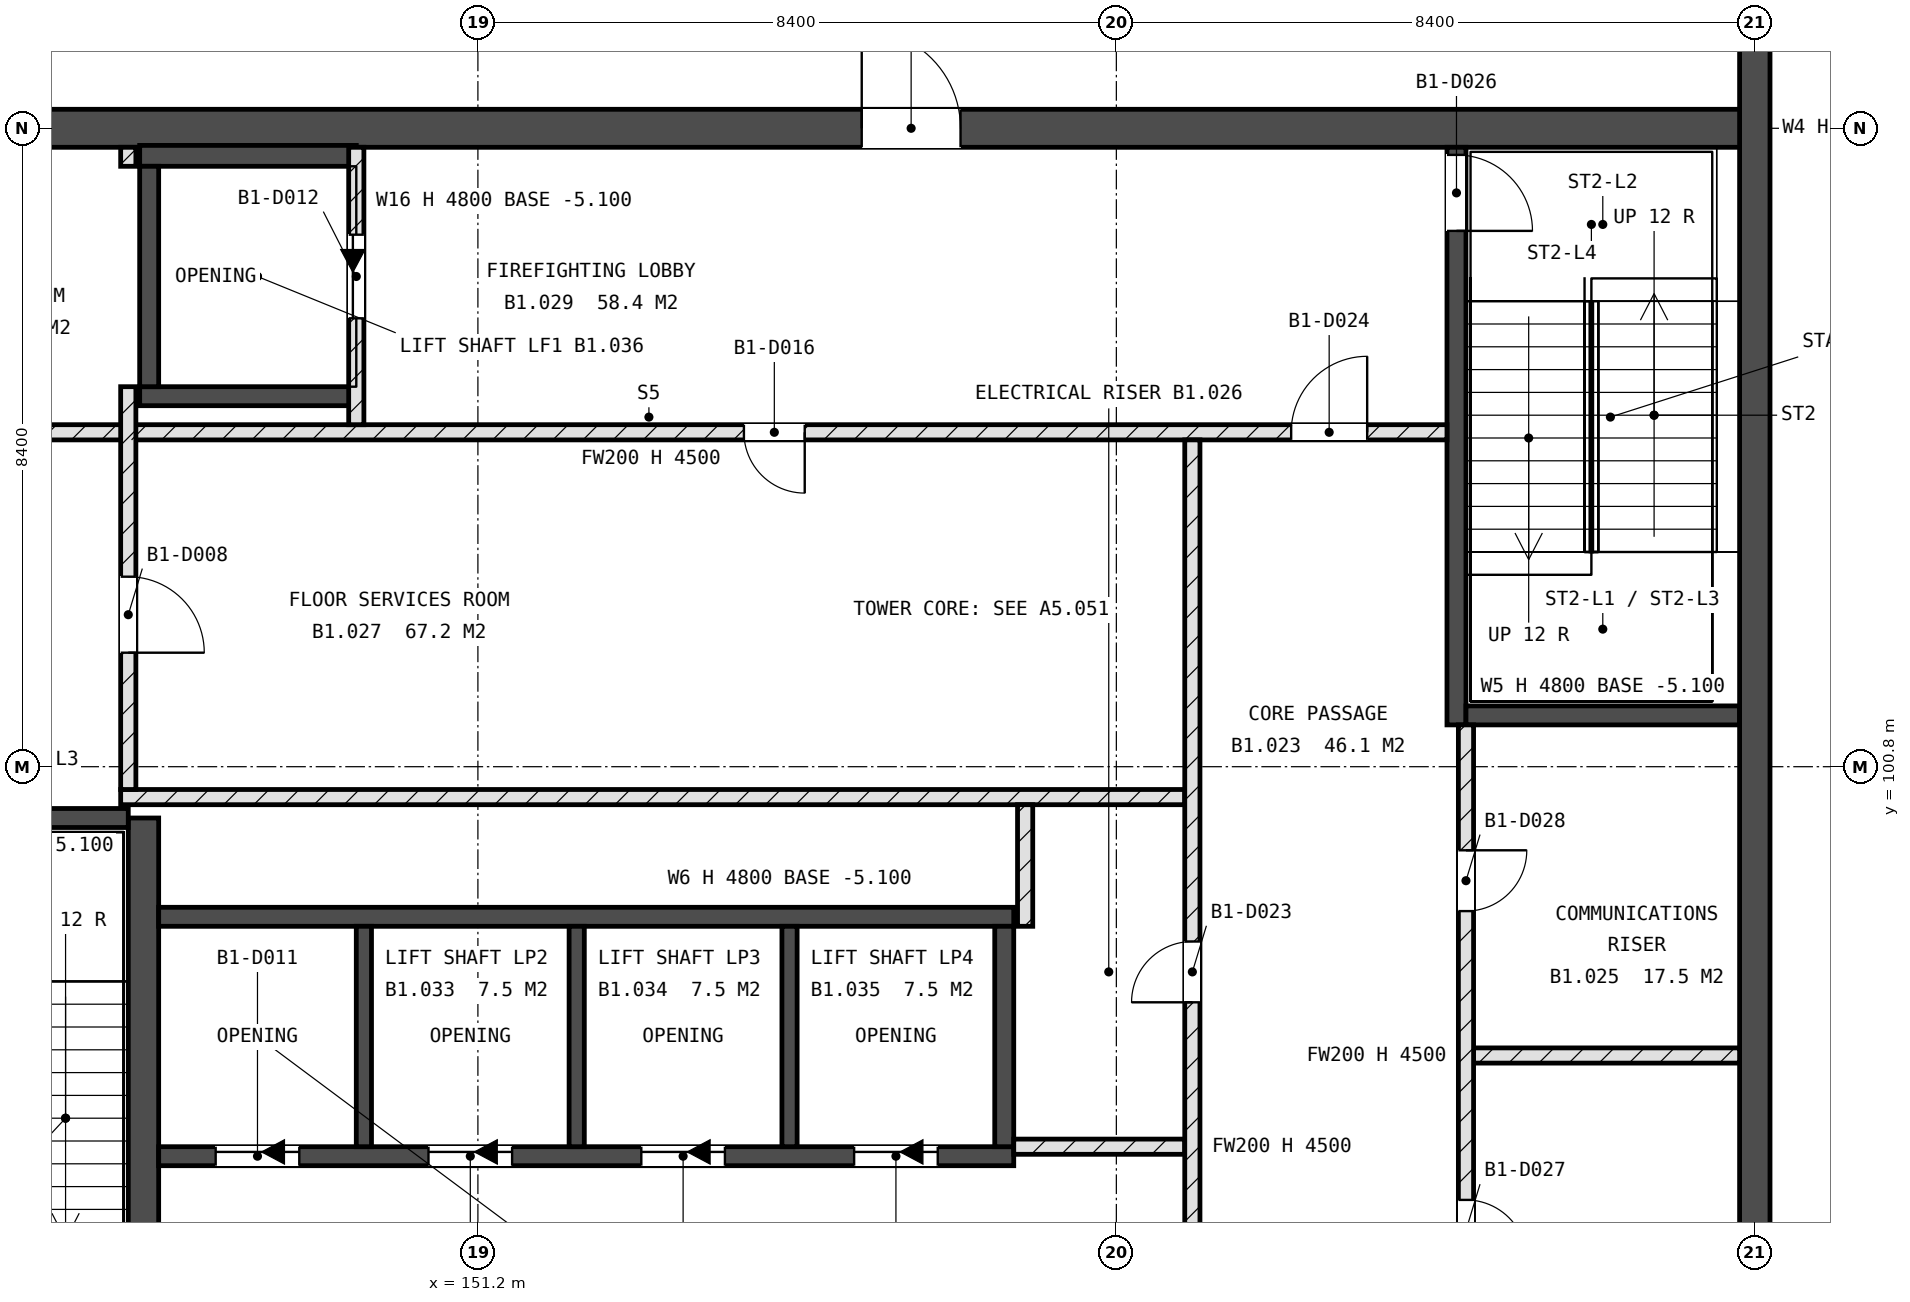
"""IFC4 building model, lengths in metres.
Left out: names, types, materials, properties, quantities, classifications, styles, units other than length and angle.
Written with IfcOpenShell. Run it as: python <this file> out.ifc"""

import sys

from ifc_helpers import new_model, si_unit, direction, frame, frame_2d, origin, place, context, subcontext, project, spatial, rectangle, extrude, element, fill, save


model = new_model("IFC4")
c1 = context("Model", 3, precision=1e-05, world=origin(), true_north=direction((0.0, 1.0)))
c2 = subcontext(c1, "Body", "Model", "MODEL_VIEW")
j1 = project(units=[si_unit("LENGTHUNIT", "METRE"), si_unit("PLANEANGLEUNIT", "RADIAN")], contexts=[c1])
p1 = place(None, origin())
s1 = spatial("IfcSite", under=j1, at=p1, CompositionType="ELEMENT")
p2 = place(p1, origin())
s2 = spatial("IfcBuilding", under=s1, at=p2, CompositionType="ELEMENT")
p3 = place(p2, frame((0.0, 0.0, -4.8)))
s3 = spatial("IfcBuildingStorey", under=s2, at=p3, CompositionType="ELEMENT", Elevation=-4.8)
p4 = place(p3, frame((142.8, 109.2, -0.3), z_axis=(0.0, 0.0, 1.0), x_axis=(1.0, 0.0, 0.0)))
e1 = element("IfcWall", 1, at=p4, inside=s3, PredefinedType="SHEAR", context=c2, shape_type="SweptSolid", body=[
    extrude(rectangle(XDim=25.2, YDim=0.5, at=frame_2d((12.6, 0.0))), origin(), (0.0, 0.0, 1.0), 4.8),
])
p5 = place(p4, frame((13.45, 0.0, 0.3)))
e2 = element("IfcOpeningElement", 2, at=p5, cuts=e1, PredefinedType="OPENING", context=c2, shape_type="SweptSolid", body=[
    extrude(rectangle(XDim=1.3, YDim=2.1, at=frame_2d((0.65, 1.05))), frame((0.0, 0.26, 0.0), z_axis=(0.0, -1.0, 0.0), x_axis=(1.0, 0.0, 0.0)), (0.0, 0.0, 1.0), 0.52),
])
p6 = place(p4, frame((1.5, 0.0, 0.3)))
e3 = element("IfcOpeningElement", 3, at=p6, cuts=e1, PredefinedType="OPENING", context=c2, shape_type="SweptSolid", body=[
    extrude(rectangle(XDim=0.8, YDim=2.1, at=frame_2d((0.4, 1.05))), frame((0.0, 0.26, 0.0), z_axis=(0.0, -1.0, 0.0), x_axis=(1.0, 0.0, 0.0)), (0.0, 0.0, 1.0), 0.52),
])
p7 = place(p3, frame((146.8, 92.65, -0.3), z_axis=(0.0, 0.0, 1.0), x_axis=(0.0, 1.0, 0.0)))
e4 = element("IfcWall", 4, at=p7, inside=s3, PredefinedType="SHEAR", context=c2, shape_type="SweptSolid", body=[
    extrude(rectangle(XDim=7.475, YDim=0.4, at=frame_2d((3.738, 0.0))), origin(), (0.0, 0.0, 1.0), 4.8),
])
p8 = place(p7, frame((0.1, 0.0, 0.3)))
e5 = element("IfcOpeningElement", 5, at=p8, cuts=e4, PredefinedType="OPENING", context=c2, shape_type="SweptSolid", body=[
    extrude(rectangle(XDim=1.0, YDim=2.1, at=frame_2d((0.5, 1.05))), frame((0.0, 0.21, 0.0), z_axis=(0.0, -1.0, 0.0), x_axis=(1.0, 0.0, 0.0)), (0.0, 0.0, 1.0), 0.42),
])
p9 = place(p3, frame((143.0, 100.125, -0.3), z_axis=(0.0, 0.0, 1.0), x_axis=(1.0, 0.0, 0.0)))
e6 = element("IfcWall", 6, at=p9, inside=s3, PredefinedType="SHEAR", context=c2, shape_type="SweptSolid", body=[
    extrude(rectangle(XDim=3.6, YDim=0.25, at=frame_2d((1.8, 0.0))), origin(), (0.0, 0.0, 1.0), 4.8),
])
p10 = place(p3, frame((164.075, 101.35, -0.3), z_axis=(0.0, 0.0, 1.0), x_axis=(0.0, 1.0, 0.0)))
e7 = element("IfcWall", 7, at=p10, inside=s3, PredefinedType="SHEAR", context=c2, shape_type="SweptSolid", body=[
    extrude(rectangle(XDim=7.6, YDim=0.25, at=frame_2d((3.8, 0.0))), origin(), (0.0, 0.0, 1.0), 4.8),
])
p11 = place(p10, frame((6.5, 0.0, 0.3)))
e8 = element("IfcOpeningElement", 8, at=p11, cuts=e7, PredefinedType="OPENING", context=c2, shape_type="SweptSolid", body=[
    extrude(rectangle(XDim=1.0, YDim=2.1, at=frame_2d((0.5, 1.05))), frame((0.0, 0.135, 0.0), z_axis=(0.0, -1.0, 0.0), x_axis=(1.0, 0.0, 0.0)), (0.0, 0.0, 1.0), 0.27),
])
p12 = place(p3, frame((164.2, 101.475, -0.3), z_axis=(0.0, 0.0, 1.0), x_axis=(1.0, 0.0, 0.0)))
e9 = element("IfcWall", 9, at=p12, inside=s3, PredefinedType="SHEAR", context=c2, shape_type="SweptSolid", body=[
    extrude(rectangle(XDim=3.6, YDim=0.25, at=frame_2d((1.8, 0.0))), origin(), (0.0, 0.0, 1.0), 4.8),
])
p13 = place(p3, frame((147.0, 95.675, -0.3), z_axis=(0.0, 0.0, 1.0), x_axis=(1.0, 0.0, 0.0)))
e10 = element("IfcWall", 10, at=p13, inside=s3, PredefinedType="SHEAR", context=c2, shape_type="SweptSolid", body=[
    extrude(rectangle(XDim=11.25, YDim=0.25, at=frame_2d((5.625, 0.0))), origin(), (0.0, 0.0, 1.0), 4.8),
])
p14 = place(p13, frame((0.75, 0.0, 0.3)))
e11 = element("IfcOpeningElement", 11, at=p14, cuts=e10, PredefinedType="OPENING", context=c2, shape_type="SweptSolid", body=[
    extrude(rectangle(XDim=1.1, YDim=2.1, at=frame_2d((0.55, 1.05))), frame((0.0, 0.135, 0.0), z_axis=(0.0, -1.0, 0.0), x_axis=(1.0, 0.0, 0.0)), (0.0, 0.0, 1.0), 0.27),
])
p15 = place(p13, frame((3.55, 0.0, 0.3)))
e12 = element("IfcOpeningElement", 12, at=p15, cuts=e10, PredefinedType="OPENING", context=c2, shape_type="SweptSolid", body=[
    extrude(rectangle(XDim=1.1, YDim=2.1, at=frame_2d((0.55, 1.05))), frame((0.0, 0.135, 0.0), z_axis=(0.0, -1.0, 0.0), x_axis=(1.0, 0.0, 0.0)), (0.0, 0.0, 1.0), 0.27),
])
p16 = place(p13, frame((6.35, 0.0, 0.3)))
e13 = element("IfcOpeningElement", 13, at=p16, cuts=e10, PredefinedType="OPENING", context=c2, shape_type="SweptSolid", body=[
    extrude(rectangle(XDim=1.1, YDim=2.1, at=frame_2d((0.55, 1.05))), frame((0.0, 0.135, 0.0), z_axis=(0.0, -1.0, 0.0), x_axis=(1.0, 0.0, 0.0)), (0.0, 0.0, 1.0), 0.27),
])
p17 = place(p13, frame((9.15, 0.0, 0.3)))
e14 = element("IfcOpeningElement", 14, at=p17, cuts=e10, PredefinedType="OPENING", context=c2, shape_type="SweptSolid", body=[
    extrude(rectangle(XDim=1.1, YDim=2.1, at=frame_2d((0.55, 1.05))), frame((0.0, 0.135, 0.0), z_axis=(0.0, -1.0, 0.0), x_axis=(1.0, 0.0, 0.0)), (0.0, 0.0, 1.0), 0.27),
])
p18 = place(p3, frame((147.0, 98.825, -0.3), z_axis=(0.0, 0.0, 1.0), x_axis=(1.0, 0.0, 0.0)))
e15 = element("IfcWall", 15, at=p18, inside=s3, PredefinedType="SHEAR", context=c2, shape_type="SweptSolid", body=[
    extrude(rectangle(XDim=11.25, YDim=0.25, at=frame_2d((5.625, 0.0))), origin(), (0.0, 0.0, 1.0), 4.8),
])
p19 = place(p3, frame((158.125, 95.8, -0.3), z_axis=(0.0, 0.0, 1.0), x_axis=(0.0, 1.0, 0.0)))
e16 = element("IfcWall", 16, at=p19, inside=s3, PredefinedType="SHEAR", context=c2, shape_type="SweptSolid", body=[
    extrude(rectangle(XDim=2.9, YDim=0.25, at=frame_2d((1.45, 0.0))), origin(), (0.0, 0.0, 1.0), 4.8),
])
for number, where, z_axis, x_axis in (
    (17, (149.7, 95.8, -0.3), (0.0, 0.0, 1.0), (0.0, 1.0, 0.0)),
    (18, (152.5, 95.8, -0.3), (0.0, 0.0, 1.0), (0.0, 1.0, 0.0)),
    (19, (155.3, 95.8, -0.3), (0.0, 0.0, 1.0), (0.0, 1.0, 0.0)),
):
    element("IfcWall", number, at=place(p3, frame(where, z_axis=z_axis, x_axis=x_axis)), inside=s3, PredefinedType="SHEAR", context=c2, shape_type="SweptSolid", body=[
        extrude(rectangle(XDim=2.9, YDim=0.2, at=frame_2d((1.45, 0.0))), origin(), (0.0, 0.0, 1.0), 4.8),
    ])
p20 = place(p3, frame((146.75, 105.675, -0.3), z_axis=(0.0, 0.0, 1.0), x_axis=(1.0, 0.0, 0.0)))
e20 = element("IfcWall", 20, at=p20, inside=s3, PredefinedType="SHEAR", context=c2, shape_type="SweptSolid", body=[
    extrude(rectangle(XDim=2.85, YDim=0.25, at=frame_2d((1.425, 0.0))), origin(), (0.0, 0.0, 1.0), 4.8),
])
p21 = place(p3, frame((146.75, 108.837, -0.3), z_axis=(0.0, 0.0, 1.0), x_axis=(1.0, 0.0, 0.0)))
e21 = element("IfcWall", 21, at=p21, inside=s3, PredefinedType="SHEAR", context=c2, shape_type="SweptSolid", body=[
    extrude(rectangle(XDim=2.85, YDim=0.275, at=frame_2d((1.425, 0.0))), origin(), (0.0, 0.0, 1.0), 4.8),
])
p22 = place(p3, frame((146.875, 105.8, -0.3), z_axis=(0.0, 0.0, 1.0), x_axis=(0.0, 1.0, 0.0)))
e22 = element("IfcWall", 22, at=p22, inside=s3, PredefinedType="SHEAR", context=c2, shape_type="SweptSolid", body=[
    extrude(rectangle(XDim=2.9, YDim=0.25, at=frame_2d((1.45, 0.0))), origin(), (0.0, 0.0, 1.0), 4.8),
])
p23 = place(p3, frame((168.0, -0.2, -0.3), z_axis=(0.0, 0.0, 1.0), x_axis=(0.0, 1.0, 0.0)))
e23 = element("IfcWall", 23, at=p23, inside=s3, PredefinedType="SOLIDWALL", context=c2, shape_type="SweptSolid", body=[
    extrude(rectangle(XDim=118.0, YDim=0.4, at=frame_2d((59.0, 0.0))), origin(), (0.0, 0.0, 1.0), 4.8),
])
p24 = place(p3, frame((158.25, 95.8, 0.0), z_axis=(0.0, 0.0, 1.0), x_axis=(1.0, 0.0, 0.0)))
e24 = element("IfcWall", 24, at=p24, inside=s3, PredefinedType="SOLIDWALL", context=c2, shape_type="SweptSolid", body=[
    extrude(rectangle(XDim=2.25, YDim=0.2, at=frame_2d((1.125, 0.0))), origin(), (0.0, 0.0, 1.0), 4.5),
])
p25 = place(p3, frame((164.3, 97.0, 0.0), z_axis=(0.0, 0.0, 1.0), x_axis=(1.0, 0.0, 0.0)))
e25 = element("IfcWall", 25, at=p25, inside=s3, PredefinedType="SOLIDWALL", context=c2, shape_type="SweptSolid", body=[
    extrude(rectangle(XDim=3.5, YDim=0.2, at=frame_2d((1.75, 0.0))), origin(), (0.0, 0.0, 1.0), 4.5),
])
p26 = place(p3, frame((146.5, 100.4, 0.0), z_axis=(0.0, 0.0, 1.0), x_axis=(1.0, 0.0, 0.0)))
e26 = element("IfcWall", 26, at=p26, inside=s3, PredefinedType="SOLIDWALL", context=c2, shape_type="SweptSolid", body=[
    extrude(rectangle(XDim=14.0, YDim=0.2, at=frame_2d((7.0, 0.0))), origin(), (0.0, 0.0, 1.0), 4.5),
])
p27 = place(p3, frame((143.0, 105.2, 0.0), z_axis=(0.0, 0.0, 1.0), x_axis=(1.0, 0.0, 0.0)))
e27 = element("IfcWall", 27, at=p27, inside=s3, PredefinedType="SOLIDWALL", context=c2, shape_type="SweptSolid", body=[
    extrude(rectangle(XDim=20.95, YDim=0.2, at=frame_2d((10.475, 0.0))), origin(), (0.0, 0.0, 1.0), 4.5),
])
p28 = place(p27, frame((11.7, 0.0, 0.0)))
e28 = element("IfcOpeningElement", 28, at=p28, cuts=e27, PredefinedType="OPENING", context=c2, shape_type="SweptSolid", body=[
    extrude(rectangle(XDim=0.8, YDim=2.1, at=frame_2d((0.4, 1.05))), frame((0.0, 0.11, 0.0), z_axis=(0.0, -1.0, 0.0), x_axis=(1.0, 0.0, 0.0)), (0.0, 0.0, 1.0), 0.22),
])
p29 = place(p27, frame((18.9, 0.0, 0.0)))
e29 = element("IfcOpeningElement", 29, at=p29, cuts=e27, PredefinedType="OPENING", context=c2, shape_type="SweptSolid", body=[
    extrude(rectangle(XDim=1.0, YDim=2.1, at=frame_2d((0.5, 1.05))), frame((0.0, 0.11, 0.0), z_axis=(0.0, -1.0, 0.0), x_axis=(1.0, 0.0, 0.0)), (0.0, 0.0, 1.0), 0.22),
])
p30 = place(p3, frame((146.6, 100.5, 0.0), z_axis=(0.0, 0.0, 1.0), x_axis=(0.0, 1.0, 0.0)))
e30 = element("IfcWall", 30, at=p30, inside=s3, PredefinedType="SOLIDWALL", context=c2, shape_type="SweptSolid", body=[
    extrude(rectangle(XDim=5.3, YDim=0.2, at=frame_2d((2.65, 0.0))), origin(), (0.0, 0.0, 1.0), 4.5),
])
p31 = place(p30, frame((1.8, 0.0, 0.0)))
e31 = element("IfcOpeningElement", 31, at=p31, cuts=e30, PredefinedType="OPENING", context=c2, shape_type="SweptSolid", body=[
    extrude(rectangle(XDim=1.0, YDim=2.1, at=frame_2d((0.5, 1.05))), frame((0.0, 0.11, 0.0), z_axis=(0.0, -1.0, 0.0), x_axis=(1.0, 0.0, 0.0)), (0.0, 0.0, 1.0), 0.22),
])
p32 = place(p3, frame((146.6, 108.7, 0.0), z_axis=(0.0, 0.0, 1.0), x_axis=(0.0, 1.0, 0.0)))
e32 = element("IfcWall", 32, at=p32, inside=s3, PredefinedType="SOLIDWALL", context=c2, shape_type="SweptSolid", body=[
    extrude(rectangle(XDim=0.25, YDim=0.2, at=frame_2d((0.125, 0.0))), origin(), (0.0, 0.0, 1.0), 4.5),
])
p33 = place(p3, frame((149.6, 105.3, 0.0), z_axis=(0.0, 0.0, 1.0), x_axis=(0.0, 1.0, 0.0)))
e33 = element("IfcWall", 33, at=p33, inside=s3, PredefinedType="SOLIDWALL", context=c2, shape_type="SweptSolid", body=[
    extrude(rectangle(XDim=3.65, YDim=0.2, at=frame_2d((1.825, 0.0))), origin(), (0.0, 0.0, 1.0), 4.5),
])
p34 = place(p33, frame((1.4, 0.0, 0.0)))
e34 = element("IfcOpeningElement", 34, at=p34, cuts=e33, PredefinedType="OPENING", context=c2, shape_type="SweptSolid", body=[
    extrude(rectangle(XDim=1.1, YDim=2.1, at=frame_2d((0.55, 1.05))), frame((0.0, 0.11, 0.0), z_axis=(0.0, -1.0, 0.0), x_axis=(1.0, 0.0, 0.0)), (0.0, 0.0, 1.0), 0.22),
])
p35 = place(p3, frame((158.4, 98.7, 0.0), z_axis=(0.0, 0.0, 1.0), x_axis=(0.0, 1.0, 0.0)))
e35 = element("IfcWall", 35, at=p35, inside=s3, PredefinedType="SOLIDWALL", context=c2, shape_type="SweptSolid", body=[
    extrude(rectangle(XDim=1.6, YDim=0.2, at=frame_2d((0.8, 0.0))), origin(), (0.0, 0.0, 1.0), 4.5),
])
p36 = place(p3, frame((160.6, 92.65, 0.0), z_axis=(0.0, 0.0, 1.0), x_axis=(0.0, 1.0, 0.0)))
e36 = element("IfcWall", 36, at=p36, inside=s3, PredefinedType="SOLIDWALL", context=c2, shape_type="SweptSolid", body=[
    extrude(rectangle(XDim=12.45, YDim=0.2, at=frame_2d((6.225, 0.0))), origin(), (0.0, 0.0, 1.0), 4.5),
])
p37 = place(p36, frame((5.05, 0.0, 0.0)))
e37 = element("IfcOpeningElement", 37, at=p37, cuts=e36, PredefinedType="OPENING", context=c2, shape_type="SweptSolid", body=[
    extrude(rectangle(XDim=0.8, YDim=2.1, at=frame_2d((0.4, 1.05))), frame((0.0, 0.11, 0.0), z_axis=(0.0, -1.0, 0.0), x_axis=(1.0, 0.0, 0.0)), (0.0, 0.0, 1.0), 0.22),
])
p38 = place(p36, frame((0.75, 0.0, 0.0)))
e38 = element("IfcOpeningElement", 38, at=p38, cuts=e36, PredefinedType="OPENING", context=c2, shape_type="SweptSolid", body=[
    extrude(rectangle(XDim=1.0, YDim=2.1, at=frame_2d((0.5, 1.05))), frame((0.0, 0.11, 0.0), z_axis=(0.0, -1.0, 0.0), x_axis=(1.0, 0.0, 0.0)), (0.0, 0.0, 1.0), 0.22),
])
p39 = place(p3, frame((164.2, 92.65, 0.0), z_axis=(0.0, 0.0, 1.0), x_axis=(0.0, 1.0, 0.0)))
e39 = element("IfcWall", 39, at=p39, inside=s3, PredefinedType="SOLIDWALL", context=c2, shape_type="SweptSolid", body=[
    extrude(rectangle(XDim=8.7, YDim=0.2, at=frame_2d((4.35, 0.0))), origin(), (0.0, 0.0, 1.0), 4.5),
])
p40 = place(p39, frame((1.65, 0.0, 0.0)))
e40 = element("IfcOpeningElement", 40, at=p40, cuts=e39, PredefinedType="OPENING", context=c2, shape_type="SweptSolid", body=[
    extrude(rectangle(XDim=0.8, YDim=2.1, at=frame_2d((0.4, 1.05))), frame((0.0, 0.11, 0.0), z_axis=(0.0, -1.0, 0.0), x_axis=(1.0, 0.0, 0.0)), (0.0, 0.0, 1.0), 0.22),
])
p41 = place(p39, frame((6.25, 0.0, 0.0)))
e41 = element("IfcOpeningElement", 41, at=p41, cuts=e39, PredefinedType="OPENING", context=c2, shape_type="SweptSolid", body=[
    extrude(rectangle(XDim=0.8, YDim=2.1, at=frame_2d((0.4, 1.05))), frame((0.0, 0.11, 0.0), z_axis=(0.0, -1.0, 0.0), x_axis=(1.0, 0.0, 0.0)), (0.0, 0.0, 1.0), 0.22),
])
p42 = place(p14, origin())
e42 = element("IfcDoor", 42, at=p42, inside=s3, OperationType="SLIDING_TO_LEFT", PredefinedType="DOOR", context=c2, shape_type="SweptSolid", body=[
    extrude(rectangle(XDim=1.1, YDim=2.1, at=frame_2d((0.55, 1.05))), frame((0.0, 0.025, 0.0), z_axis=(0.0, -1.0, 0.0), x_axis=(1.0, 0.0, 0.0)), (0.0, 0.0, 1.0), 0.05),
])
fill(e11, e42)
p43 = place(p15, origin())
e43 = element("IfcDoor", 43, at=p43, inside=s3, OperationType="SLIDING_TO_LEFT", PredefinedType="DOOR", context=c2, shape_type="SweptSolid", body=[
    extrude(rectangle(XDim=1.1, YDim=2.1, at=frame_2d((0.55, 1.05))), frame((0.0, 0.025, 0.0), z_axis=(0.0, -1.0, 0.0), x_axis=(1.0, 0.0, 0.0)), (0.0, 0.0, 1.0), 0.05),
])
fill(e12, e43)
p44 = place(p16, origin())
e44 = element("IfcDoor", 44, at=p44, inside=s3, OperationType="SLIDING_TO_LEFT", PredefinedType="DOOR", context=c2, shape_type="SweptSolid", body=[
    extrude(rectangle(XDim=1.1, YDim=2.1, at=frame_2d((0.55, 1.05))), frame((0.0, 0.025, 0.0), z_axis=(0.0, -1.0, 0.0), x_axis=(1.0, 0.0, 0.0)), (0.0, 0.0, 1.0), 0.05),
])
fill(e13, e44)
p45 = place(p17, origin())
e45 = element("IfcDoor", 45, at=p45, inside=s3, OperationType="SLIDING_TO_LEFT", PredefinedType="DOOR", context=c2, shape_type="SweptSolid", body=[
    extrude(rectangle(XDim=1.1, YDim=2.1, at=frame_2d((0.55, 1.05))), frame((0.0, 0.025, 0.0), z_axis=(0.0, -1.0, 0.0), x_axis=(1.0, 0.0, 0.0)), (0.0, 0.0, 1.0), 0.05),
])
fill(e14, e45)
p46 = place(p34, origin())
e46 = element("IfcDoor", 46, at=p46, inside=s3, OperationType="SLIDING_TO_LEFT", PredefinedType="DOOR", context=c2, shape_type="SweptSolid", body=[
    extrude(rectangle(XDim=1.1, YDim=2.1, at=frame_2d((0.55, 1.05))), frame((0.0, 0.025, 0.0), z_axis=(0.0, -1.0, 0.0), x_axis=(1.0, 0.0, 0.0)), (0.0, 0.0, 1.0), 0.05),
])
fill(e34, e46)
p47 = place(p11, origin())
e47 = element("IfcDoor", 47, at=p47, inside=s3, OperationType="SINGLE_SWING_LEFT", PredefinedType="DOOR", context=c2, shape_type="SweptSolid", body=[
    extrude(rectangle(XDim=1.0, YDim=2.1, at=frame_2d((0.5, 1.05))), frame((0.0, 0.025, 0.0), z_axis=(0.0, -1.0, 0.0), x_axis=(1.0, 0.0, 0.0)), (0.0, 0.0, 1.0), 0.05),
])
fill(e8, e47)
p48 = place(p5, origin())
e48 = element("IfcDoor", 48, at=p48, inside=s3, OperationType="SINGLE_SWING_RIGHT", PredefinedType="DOOR", context=c2, shape_type="SweptSolid", body=[
    extrude(rectangle(XDim=1.3, YDim=2.1, at=frame_2d((0.65, 1.05))), frame((0.0, 0.025, 0.0), z_axis=(0.0, -1.0, 0.0), x_axis=(1.0, 0.0, 0.0)), (0.0, 0.0, 1.0), 0.05),
])
fill(e2, e48)
p49 = place(p40, origin())
e49 = element("IfcDoor", 49, at=p49, inside=s3, OperationType="SINGLE_SWING_LEFT", PredefinedType="DOOR", context=c2, shape_type="SweptSolid", body=[
    extrude(rectangle(XDim=0.8, YDim=2.1, at=frame_2d((0.4, 1.05))), frame((0.0, 0.025, 0.0), z_axis=(0.0, -1.0, 0.0), x_axis=(1.0, 0.0, 0.0)), (0.0, 0.0, 1.0), 0.05),
])
fill(e40, e49)
p50 = place(p41, origin())
e50 = element("IfcDoor", 50, at=p50, inside=s3, OperationType="SINGLE_SWING_RIGHT", PredefinedType="DOOR", context=c2, shape_type="SweptSolid", body=[
    extrude(rectangle(XDim=0.8, YDim=2.1, at=frame_2d((0.4, 1.05))), frame((0.0, 0.025, 0.0), z_axis=(0.0, -1.0, 0.0), x_axis=(1.0, 0.0, 0.0)), (0.0, 0.0, 1.0), 0.05),
])
fill(e41, e50)
p51 = place(p37, origin())
e51 = element("IfcDoor", 51, at=p51, inside=s3, OperationType="SINGLE_SWING_RIGHT", PredefinedType="DOOR", context=c2, shape_type="SweptSolid", body=[
    extrude(rectangle(XDim=0.8, YDim=2.1, at=frame_2d((0.4, 1.05))), frame((0.0, 0.025, 0.0), z_axis=(0.0, -1.0, 0.0), x_axis=(1.0, 0.0, 0.0)), (0.0, 0.0, 1.0), 0.05),
])
fill(e37, e51)
p52 = place(p28, origin())
e52 = element("IfcDoor", 52, at=p52, inside=s3, OperationType="SINGLE_SWING_RIGHT", PredefinedType="DOOR", context=c2, shape_type="SweptSolid", body=[
    extrude(rectangle(XDim=0.8, YDim=2.1, at=frame_2d((0.4, 1.05))), frame((0.0, 0.025, 0.0), z_axis=(0.0, -1.0, 0.0), x_axis=(1.0, 0.0, 0.0)), (0.0, 0.0, 1.0), 0.05),
])
fill(e28, e52)
p53 = place(p31, origin())
e53 = element("IfcDoor", 53, at=p53, inside=s3, OperationType="SINGLE_SWING_LEFT", PredefinedType="DOOR", context=c2, shape_type="SweptSolid", body=[
    extrude(rectangle(XDim=1.0, YDim=2.1, at=frame_2d((0.5, 1.05))), frame((0.0, 0.025, 0.0), z_axis=(0.0, -1.0, 0.0), x_axis=(1.0, 0.0, 0.0)), (0.0, 0.0, 1.0), 0.05),
])
fill(e31, e53)
p54 = place(p29, origin())
e54 = element("IfcDoor", 54, at=p54, inside=s3, OperationType="SINGLE_SWING_LEFT", PredefinedType="DOOR", context=c2, shape_type="SweptSolid", body=[
    extrude(rectangle(XDim=1.0, YDim=2.1, at=frame_2d((0.5, 1.05))), frame((0.0, 0.025, 0.0), z_axis=(0.0, -1.0, 0.0), x_axis=(1.0, 0.0, 0.0)), (0.0, 0.0, 1.0), 0.05),
])
fill(e29, e54)
save(model, sys.argv[1])
